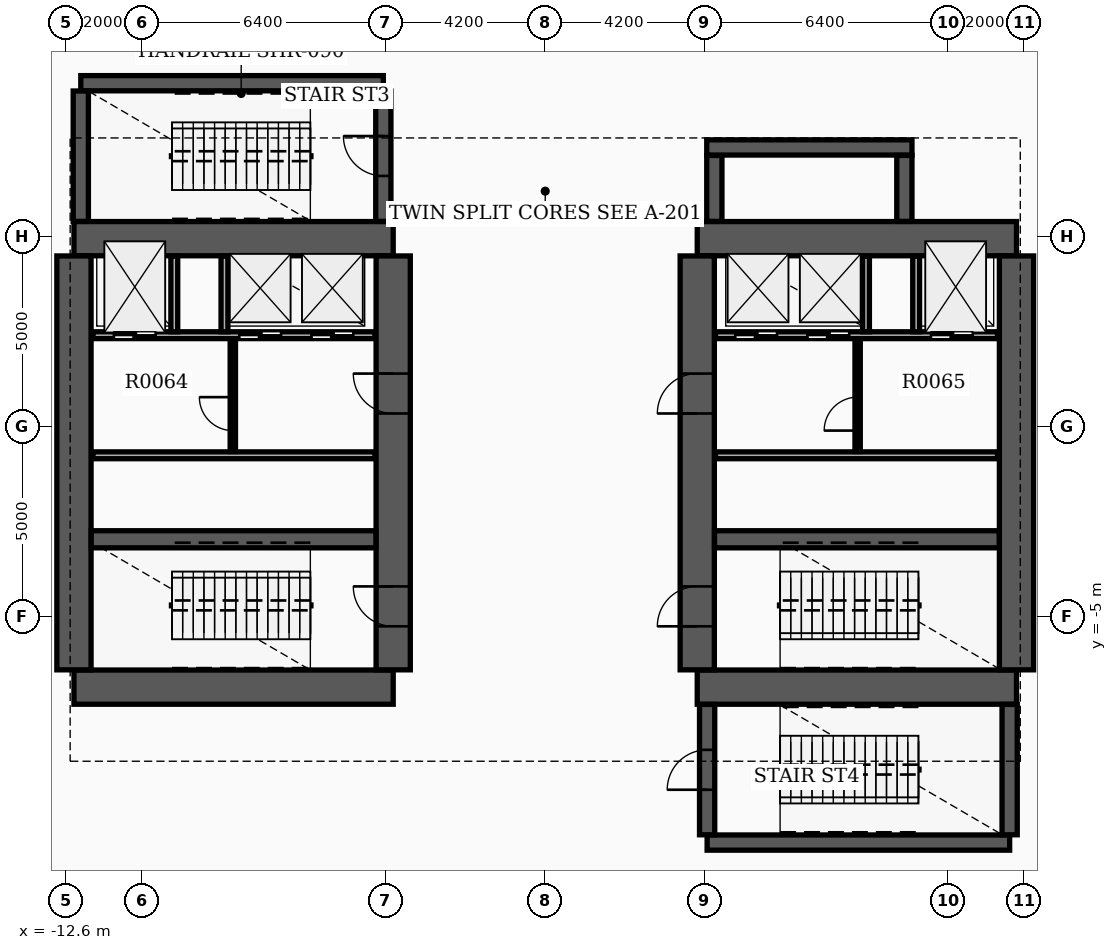
"""IFC4 building model, lengths in metres.
Left out: names, types, materials, properties, quantities, classifications, styles, units other than length and angle.
Written with IfcOpenShell. Run it as: python <this file> out.ifc"""

import sys

from ifc_helpers import new_model, si_unit, direction, frame, frame_2d, origin, place, context, subcontext, project, spatial, rectangle, extrude, element, fill, save


model = new_model("IFC4")
c1 = context("Model", 3, precision=1e-05, world=origin(), true_north=direction((0.0, 1.0)))
c2 = subcontext(c1, "Body", "Model", "MODEL_VIEW")
j1 = project(units=[si_unit("LENGTHUNIT", "METRE"), si_unit("PLANEANGLEUNIT", "RADIAN")], contexts=[c1])
p1 = place(None, origin())
s1 = spatial("IfcSite", under=j1, at=p1, CompositionType="ELEMENT")
p2 = place(p1, origin())
s2 = spatial("IfcBuilding", under=s1, at=p2, CompositionType="ELEMENT")
p3 = place(p2, frame((0.0, 0.0, -5.2)))
s3 = spatial("IfcBuildingStorey", under=s2, at=p3, CompositionType="ELEMENT", Elevation=-5.2)
for number, where, z_axis, x_axis in (
    (1, (-12.4, -6.85, 0.0), (0.0, 0.0, 1.0), (1.0, 0.0, 0.0)),
    (2, (-12.4, 4.95, 0.0), (0.0, 0.0, 1.0), (1.0, 0.0, 0.0)),
):
    element("IfcWall", number, at=place(p3, frame(where, z_axis=z_axis, x_axis=x_axis)), inside=s3, PredefinedType="SHEAR", context=c2, shape_type="SweptSolid", body=[
        extrude(rectangle(XDim=8.4, YDim=0.9, at=frame_2d((4.2, 0.0))), origin(), (0.0, 0.0, 1.0), 4.95),
    ])
p4 = place(p3, frame((-12.4, -6.395, 0.0), z_axis=(0.0, 0.0, 1.0), x_axis=(0.0, 1.0, 0.0)))
e3 = element("IfcWall", 3, at=p4, inside=s3, PredefinedType="SHEAR", context=c2, shape_type="SweptSolid", body=[
    extrude(rectangle(XDim=10.89, YDim=0.9, at=frame_2d((5.445, 0.0))), origin(), (0.0, 0.0, 1.0), 4.95),
])
p5 = place(p3, frame((-4.0, -6.395, 0.0), z_axis=(0.0, 0.0, 1.0), x_axis=(0.0, 1.0, 0.0)))
e4 = element("IfcWall", 4, at=p5, inside=s3, PredefinedType="SHEAR", context=c2, shape_type="SweptSolid", body=[
    extrude(rectangle(XDim=10.89, YDim=0.9, at=frame_2d((5.445, 0.0))), origin(), (0.0, 0.0, 1.0), 4.95),
])
p6 = place(p5, frame((1.145, 0.0, 0.0)))
e5 = element("IfcOpeningElement", 5, at=p6, cuts=e4, PredefinedType="OPENING", context=c2, shape_type="SweptSolid", body=[
    extrude(rectangle(XDim=1.05, YDim=2.15, at=frame_2d((0.525, 1.075))), frame((0.0, 0.46, 0.0), z_axis=(0.0, -1.0, 0.0), x_axis=(1.0, 0.0, 0.0)), (0.0, 0.0, 1.0), 0.92),
])
p7 = place(p5, frame((6.745, 0.0, 0.0)))
e6 = element("IfcOpeningElement", 6, at=p7, cuts=e4, PredefinedType="OPENING", context=c2, shape_type="SweptSolid", body=[
    extrude(rectangle(XDim=1.05, YDim=2.15, at=frame_2d((0.525, 1.075))), frame((0.0, 0.46, 0.0), z_axis=(0.0, -1.0, 0.0), x_axis=(1.0, 0.0, 0.0)), (0.0, 0.0, 1.0), 0.92),
])
p8 = place(p3, frame((-11.945, -2.96, 0.0), z_axis=(0.0, 0.0, 1.0), x_axis=(1.0, 0.0, 0.0)))
e7 = element("IfcWall", 7, at=p8, inside=s3, PredefinedType="SHEAR", context=c2, shape_type="SweptSolid", body=[
    extrude(rectangle(XDim=7.49, YDim=0.45, at=frame_2d((3.745, 0.0))), origin(), (0.0, 0.0, 1.0), 4.95),
])
for number, where, z_axis, x_axis in (
    (8, (4.0, -6.85, 0.0), (0.0, 0.0, 1.0), (1.0, 0.0, 0.0)),
    (9, (4.0, 4.95, 0.0), (0.0, 0.0, 1.0), (1.0, 0.0, 0.0)),
):
    element("IfcWall", number, at=place(p3, frame(where, z_axis=z_axis, x_axis=x_axis)), inside=s3, PredefinedType="SHEAR", context=c2, shape_type="SweptSolid", body=[
        extrude(rectangle(XDim=8.4, YDim=0.9, at=frame_2d((4.2, 0.0))), origin(), (0.0, 0.0, 1.0), 4.95),
    ])
p9 = place(p3, frame((4.0, -6.395, 0.0), z_axis=(0.0, 0.0, 1.0), x_axis=(0.0, 1.0, 0.0)))
e10 = element("IfcWall", 10, at=p9, inside=s3, PredefinedType="SHEAR", context=c2, shape_type="SweptSolid", body=[
    extrude(rectangle(XDim=10.89, YDim=0.9, at=frame_2d((5.445, 0.0))), origin(), (0.0, 0.0, 1.0), 4.95),
])
p10 = place(p9, frame((1.145, 0.0, 0.0)))
e11 = element("IfcOpeningElement", 11, at=p10, cuts=e10, PredefinedType="OPENING", context=c2, shape_type="SweptSolid", body=[
    extrude(rectangle(XDim=1.05, YDim=2.15, at=frame_2d((0.525, 1.075))), frame((0.0, 0.46, 0.0), z_axis=(0.0, -1.0, 0.0), x_axis=(1.0, 0.0, 0.0)), (0.0, 0.0, 1.0), 0.92),
])
p11 = place(p9, frame((6.745, 0.0, 0.0)))
e12 = element("IfcOpeningElement", 12, at=p11, cuts=e10, PredefinedType="OPENING", context=c2, shape_type="SweptSolid", body=[
    extrude(rectangle(XDim=1.05, YDim=2.15, at=frame_2d((0.525, 1.075))), frame((0.0, 0.46, 0.0), z_axis=(0.0, -1.0, 0.0), x_axis=(1.0, 0.0, 0.0)), (0.0, 0.0, 1.0), 0.92),
])
p12 = place(p3, frame((12.4, -6.395, 0.0), z_axis=(0.0, 0.0, 1.0), x_axis=(0.0, 1.0, 0.0)))
e13 = element("IfcWall", 13, at=p12, inside=s3, PredefinedType="SHEAR", context=c2, shape_type="SweptSolid", body=[
    extrude(rectangle(XDim=10.89, YDim=0.9, at=frame_2d((5.445, 0.0))), origin(), (0.0, 0.0, 1.0), 4.95),
])
p13 = place(p3, frame((4.455, -2.96, 0.0), z_axis=(0.0, 0.0, 1.0), x_axis=(1.0, 0.0, 0.0)))
e14 = element("IfcWall", 14, at=p13, inside=s3, PredefinedType="SHEAR", context=c2, shape_type="SweptSolid", body=[
    extrude(rectangle(XDim=7.49, YDim=0.45, at=frame_2d((3.745, 0.0))), origin(), (0.0, 0.0, 1.0), 4.95),
])
p14 = place(p3, frame((-12.22, 9.04, 0.0), z_axis=(0.0, 0.0, 1.0), x_axis=(1.0, 0.0, 0.0)))
e15 = element("IfcWall", 15, at=p14, inside=s3, PredefinedType="SHEAR", context=c2, shape_type="SweptSolid", body=[
    extrude(rectangle(XDim=7.96, YDim=0.4, at=frame_2d((3.98, 0.0))), origin(), (0.0, 0.0, 1.0), 4.95),
])
p15 = place(p3, frame((-12.22, 5.405, 0.0), z_axis=(0.0, 0.0, 1.0), x_axis=(0.0, 1.0, 0.0)))
e16 = element("IfcWall", 16, at=p15, inside=s3, PredefinedType="SHEAR", context=c2, shape_type="SweptSolid", body=[
    extrude(rectangle(XDim=3.43, YDim=0.4, at=frame_2d((1.715, 0.0))), origin(), (0.0, 0.0, 1.0), 4.95),
])
p16 = place(p3, frame((-4.26, 5.405, 0.0), z_axis=(0.0, 0.0, 1.0), x_axis=(0.0, 1.0, 0.0)))
e17 = element("IfcWall", 17, at=p16, inside=s3, PredefinedType="SHEAR", context=c2, shape_type="SweptSolid", body=[
    extrude(rectangle(XDim=3.43, YDim=0.4, at=frame_2d((1.715, 0.0))), origin(), (0.0, 0.0, 1.0), 4.95),
])
p17 = place(p16, frame((1.195, 0.0, 0.0)))
e18 = element("IfcOpeningElement", 18, at=p17, cuts=e17, PredefinedType="OPENING", context=c2, shape_type="SweptSolid", body=[
    extrude(rectangle(XDim=1.05, YDim=2.15, at=frame_2d((0.525, 1.075))), frame((0.0, 0.21, 0.0), z_axis=(0.0, -1.0, 0.0), x_axis=(1.0, 0.0, 0.0)), (0.0, 0.0, 1.0), 0.42),
])
p18 = place(p3, frame((4.26, -10.94, 0.0), z_axis=(0.0, 0.0, 1.0), x_axis=(1.0, 0.0, 0.0)))
e19 = element("IfcWall", 19, at=p18, inside=s3, PredefinedType="SHEAR", context=c2, shape_type="SweptSolid", body=[
    extrude(rectangle(XDim=7.96, YDim=0.4, at=frame_2d((3.98, 0.0))), origin(), (0.0, 0.0, 1.0), 4.95),
])
p19 = place(p3, frame((4.26, -10.735, 0.0), z_axis=(0.0, 0.0, 1.0), x_axis=(0.0, 1.0, 0.0)))
e20 = element("IfcWall", 20, at=p19, inside=s3, PredefinedType="SHEAR", context=c2, shape_type="SweptSolid", body=[
    extrude(rectangle(XDim=3.43, YDim=0.4, at=frame_2d((1.715, 0.0))), origin(), (0.0, 0.0, 1.0), 4.95),
])
p20 = place(p19, frame((1.185, 0.0, 0.0)))
e21 = element("IfcOpeningElement", 21, at=p20, cuts=e20, PredefinedType="OPENING", context=c2, shape_type="SweptSolid", body=[
    extrude(rectangle(XDim=1.05, YDim=2.15, at=frame_2d((0.525, 1.075))), frame((0.0, 0.21, 0.0), z_axis=(0.0, -1.0, 0.0), x_axis=(1.0, 0.0, 0.0)), (0.0, 0.0, 1.0), 0.42),
])
p21 = place(p3, frame((12.22, -10.735, 0.0), z_axis=(0.0, 0.0, 1.0), x_axis=(0.0, 1.0, 0.0)))
e22 = element("IfcWall", 22, at=p21, inside=s3, PredefinedType="SHEAR", context=c2, shape_type="SweptSolid", body=[
    extrude(rectangle(XDim=3.43, YDim=0.4, at=frame_2d((1.715, 0.0))), origin(), (0.0, 0.0, 1.0), 4.95),
])
p22 = place(p3, frame((4.45, 5.405, 0.0), z_axis=(0.0, 0.0, 1.0), x_axis=(0.0, 1.0, 0.0)))
e23 = element("IfcWall", 23, at=p22, inside=s3, PredefinedType="SHEAR", context=c2, shape_type="SweptSolid", body=[
    extrude(rectangle(XDim=1.735, YDim=0.4, at=frame_2d((0.867, 0.0))), origin(), (0.0, 0.0, 1.0), 4.95),
])
p23 = place(p3, frame((4.25, 7.35, 0.0), z_axis=(0.0, 0.0, 1.0), x_axis=(1.0, 0.0, 0.0)))
e24 = element("IfcWall", 24, at=p23, inside=s3, PredefinedType="SHEAR", context=c2, shape_type="SweptSolid", body=[
    extrude(rectangle(XDim=5.4, YDim=0.4, at=frame_2d((2.7, 0.0))), origin(), (0.0, 0.0, 1.0), 4.95),
])
p24 = place(p3, frame((9.45, 5.405, 0.0), z_axis=(0.0, 0.0, 1.0), x_axis=(0.0, 1.0, 0.0)))
e25 = element("IfcWall", 25, at=p24, inside=s3, PredefinedType="SHEAR", context=c2, shape_type="SweptSolid", body=[
    extrude(rectangle(XDim=1.735, YDim=0.4, at=frame_2d((0.867, 0.0))), origin(), (0.0, 0.0, 1.0), 4.95),
])
p25 = place(p3, frame((-11.9, 2.41, 0.0), z_axis=(0.0, 0.0, 1.0), x_axis=(1.0, 0.0, 0.0)))
e26 = element("IfcWall", 26, at=p25, inside=s3, PredefinedType="SOLIDWALL", context=c2, shape_type="SweptSolid", body=[
    extrude(rectangle(XDim=7.42, YDim=0.18, at=frame_2d((3.71, 0.0))), origin(), (0.0, 0.0, 1.0), 3.97),
])
p26 = place(p25, frame((0.55, 0.0, 0.0)))
e27 = element("IfcOpeningElement", 27, at=p26, cuts=e26, PredefinedType="OPENING", context=c2, shape_type="SweptSolid", body=[
    extrude(rectangle(XDim=1.1, YDim=2.15, at=frame_2d((0.55, 1.075))), frame((0.0, 0.1, 0.0), z_axis=(0.0, -1.0, 0.0), x_axis=(1.0, 0.0, 0.0)), (0.0, 0.0, 1.0), 0.2),
])
p27 = place(p25, frame((3.85, 0.0, 0.0)))
e28 = element("IfcOpeningElement", 28, at=p27, cuts=e26, PredefinedType="OPENING", context=c2, shape_type="SweptSolid", body=[
    extrude(rectangle(XDim=1.1, YDim=2.15, at=frame_2d((0.55, 1.075))), frame((0.0, 0.1, 0.0), z_axis=(0.0, -1.0, 0.0), x_axis=(1.0, 0.0, 0.0)), (0.0, 0.0, 1.0), 0.2),
])
p28 = place(p25, frame((5.75, 0.0, 0.0)))
e29 = element("IfcOpeningElement", 29, at=p28, cuts=e26, PredefinedType="OPENING", context=c2, shape_type="SweptSolid", body=[
    extrude(rectangle(XDim=1.1, YDim=2.15, at=frame_2d((0.55, 1.075))), frame((0.0, 0.1, 0.0), z_axis=(0.0, -1.0, 0.0), x_axis=(1.0, 0.0, 0.0)), (0.0, 0.0, 1.0), 0.2),
])
p29 = place(p3, frame((4.48, 2.41, 0.0), z_axis=(0.0, 0.0, 1.0), x_axis=(1.0, 0.0, 0.0)))
e30 = element("IfcWall", 30, at=p29, inside=s3, PredefinedType="SOLIDWALL", context=c2, shape_type="SweptSolid", body=[
    extrude(rectangle(XDim=7.42, YDim=0.18, at=frame_2d((3.71, 0.0))), origin(), (0.0, 0.0, 1.0), 3.97),
])
p30 = place(p29, frame((5.67, 0.0, 0.0)))
e31 = element("IfcOpeningElement", 31, at=p30, cuts=e30, PredefinedType="OPENING", context=c2, shape_type="SweptSolid", body=[
    extrude(rectangle(XDim=1.1, YDim=2.15, at=frame_2d((0.55, 1.075))), frame((0.0, 0.1, 0.0), z_axis=(0.0, -1.0, 0.0), x_axis=(1.0, 0.0, 0.0)), (0.0, 0.0, 1.0), 0.2),
])
p31 = place(p29, frame((0.52, 0.0, 0.0)))
e32 = element("IfcOpeningElement", 32, at=p31, cuts=e30, PredefinedType="OPENING", context=c2, shape_type="SweptSolid", body=[
    extrude(rectangle(XDim=1.1, YDim=2.15, at=frame_2d((0.55, 1.075))), frame((0.0, 0.1, 0.0), z_axis=(0.0, -1.0, 0.0), x_axis=(1.0, 0.0, 0.0)), (0.0, 0.0, 1.0), 0.2),
])
p32 = place(p29, frame((2.42, 0.0, 0.0)))
e33 = element("IfcOpeningElement", 33, at=p32, cuts=e30, PredefinedType="OPENING", context=c2, shape_type="SweptSolid", body=[
    extrude(rectangle(XDim=1.1, YDim=2.15, at=frame_2d((0.55, 1.075))), frame((0.0, 0.1, 0.0), z_axis=(0.0, -1.0, 0.0), x_axis=(1.0, 0.0, 0.0)), (0.0, 0.0, 1.0), 0.2),
])
for number, where, z_axis, x_axis in (
    (34, (-11.9, -0.75, 0.0), (0.0, 0.0, 1.0), (1.0, 0.0, 0.0)),
    (35, (4.48, -0.75, 0.0), (0.0, 0.0, 1.0), (1.0, 0.0, 0.0)),
):
    element("IfcWall", number, at=place(p3, frame(where, z_axis=z_axis, x_axis=x_axis)), inside=s3, PredefinedType="SOLIDWALL", context=c2, shape_type="SweptSolid", body=[
        extrude(rectangle(XDim=7.42, YDim=0.18, at=frame_2d((3.71, 0.0))), origin(), (0.0, 0.0, 1.0), 3.97),
    ])
for number, where, z_axis, x_axis in (
    (36, (-9.76, 2.5, 0.0), (0.0, 0.0, 1.0), (0.0, 1.0, 0.0)),
    (37, (-8.44, 2.5, 0.0), (0.0, 0.0, 1.0), (0.0, 1.0, 0.0)),
    (38, (8.44, 2.5, 0.0), (0.0, 0.0, 1.0), (0.0, 1.0, 0.0)),
    (39, (9.76, 2.5, 0.0), (0.0, 0.0, 1.0), (0.0, 1.0, 0.0)),
):
    element("IfcWall", number, at=place(p3, frame(where, z_axis=z_axis, x_axis=x_axis)), inside=s3, PredefinedType="SOLIDWALL", context=c2, shape_type="SweptSolid", body=[
        extrude(rectangle(XDim=1.99, YDim=0.18, at=frame_2d((0.995, 0.0))), origin(), (0.0, 0.0, 1.0), 3.97),
    ])
p33 = place(p3, frame((-8.22, -0.65, 0.0), z_axis=(0.0, 0.0, 1.0), x_axis=(0.0, 1.0, 0.0)))
e40 = element("IfcWall", 40, at=p33, inside=s3, PredefinedType="SOLIDWALL", context=c2, shape_type="SweptSolid", body=[
    extrude(rectangle(XDim=2.96, YDim=0.14, at=frame_2d((1.48, 0.0))), origin(), (0.0, 0.0, 1.0), 3.97),
])
p34 = place(p33, frame((0.55, 0.0, 0.0)))
e41 = element("IfcOpeningElement", 41, at=p34, cuts=e40, PredefinedType="OPENING", context=c2, shape_type="SweptSolid", body=[
    extrude(rectangle(XDim=0.88, YDim=2.1, at=frame_2d((0.44, 1.05))), frame((0.0, 0.08, 0.0), z_axis=(0.0, -1.0, 0.0), x_axis=(1.0, 0.0, 0.0)), (0.0, 0.0, 1.0), 0.16),
])
p35 = place(p3, frame((8.22, -0.65, 0.0), z_axis=(0.0, 0.0, 1.0), x_axis=(0.0, 1.0, 0.0)))
e42 = element("IfcWall", 42, at=p35, inside=s3, PredefinedType="SOLIDWALL", context=c2, shape_type="SweptSolid", body=[
    extrude(rectangle(XDim=2.96, YDim=0.14, at=frame_2d((1.48, 0.0))), origin(), (0.0, 0.0, 1.0), 3.97),
])
p36 = place(p35, frame((0.55, 0.0, 0.0)))
e43 = element("IfcOpeningElement", 43, at=p36, cuts=e42, PredefinedType="OPENING", context=c2, shape_type="SweptSolid", body=[
    extrude(rectangle(XDim=0.88, YDim=2.1, at=frame_2d((0.44, 1.05))), frame((0.0, 0.08, 0.0), z_axis=(0.0, -1.0, 0.0), x_axis=(1.0, 0.0, 0.0)), (0.0, 0.0, 1.0), 0.16),
])
p37 = place(p6, origin())
e44 = element("IfcDoor", 44, at=p37, inside=s3, OperationType="SINGLE_SWING_RIGHT", PredefinedType="DOOR", context=c2, shape_type="SweptSolid", body=[
    extrude(rectangle(XDim=1.05, YDim=2.15, at=frame_2d((0.525, 1.075))), frame((0.0, 0.025, 0.0), z_axis=(0.0, -1.0, 0.0), x_axis=(1.0, 0.0, 0.0)), (0.0, 0.0, 1.0), 0.05),
])
fill(e5, e44)
p38 = place(p10, origin())
e45 = element("IfcDoor", 45, at=p38, inside=s3, OperationType="SINGLE_SWING_LEFT", PredefinedType="DOOR", context=c2, shape_type="SweptSolid", body=[
    extrude(rectangle(XDim=1.05, YDim=2.15, at=frame_2d((0.525, 1.075))), frame((0.0, 0.025, 0.0), z_axis=(0.0, -1.0, 0.0), x_axis=(1.0, 0.0, 0.0)), (0.0, 0.0, 1.0), 0.05),
])
fill(e11, e45)
p39 = place(p7, origin())
e46 = element("IfcDoor", 46, at=p39, inside=s3, OperationType="SINGLE_SWING_RIGHT", PredefinedType="DOOR", context=c2, shape_type="SweptSolid", body=[
    extrude(rectangle(XDim=1.05, YDim=2.15, at=frame_2d((0.525, 1.075))), frame((0.0, 0.025, 0.0), z_axis=(0.0, -1.0, 0.0), x_axis=(1.0, 0.0, 0.0)), (0.0, 0.0, 1.0), 0.05),
])
fill(e6, e46)
p40 = place(p11, origin())
e47 = element("IfcDoor", 47, at=p40, inside=s3, OperationType="SINGLE_SWING_LEFT", PredefinedType="DOOR", context=c2, shape_type="SweptSolid", body=[
    extrude(rectangle(XDim=1.05, YDim=2.15, at=frame_2d((0.525, 1.075))), frame((0.0, 0.025, 0.0), z_axis=(0.0, -1.0, 0.0), x_axis=(1.0, 0.0, 0.0)), (0.0, 0.0, 1.0), 0.05),
])
fill(e12, e47)
p41 = place(p17, origin())
e48 = element("IfcDoor", 48, at=p41, inside=s3, OperationType="SINGLE_SWING_RIGHT", PredefinedType="DOOR", context=c2, shape_type="SweptSolid", body=[
    extrude(rectangle(XDim=1.05, YDim=2.15, at=frame_2d((0.525, 1.075))), frame((0.0, 0.025, 0.0), z_axis=(0.0, -1.0, 0.0), x_axis=(1.0, 0.0, 0.0)), (0.0, 0.0, 1.0), 0.05),
])
fill(e18, e48)
p42 = place(p20, origin())
e49 = element("IfcDoor", 49, at=p42, inside=s3, OperationType="SINGLE_SWING_LEFT", PredefinedType="DOOR", context=c2, shape_type="SweptSolid", body=[
    extrude(rectangle(XDim=1.05, YDim=2.15, at=frame_2d((0.525, 1.075))), frame((0.0, 0.025, 0.0), z_axis=(0.0, -1.0, 0.0), x_axis=(1.0, 0.0, 0.0)), (0.0, 0.0, 1.0), 0.05),
])
fill(e21, e49)
p43 = place(p26, origin())
e50 = element("IfcDoor", 50, at=p43, inside=s3, OperationType="DOUBLE_DOOR_SLIDING", PredefinedType="DOOR", context=c2, shape_type="SweptSolid", body=[
    extrude(rectangle(XDim=1.1, YDim=2.15, at=frame_2d((0.55, 1.075))), frame((0.0, 0.025, 0.0), z_axis=(0.0, -1.0, 0.0), x_axis=(1.0, 0.0, 0.0)), (0.0, 0.0, 1.0), 0.05),
])
fill(e27, e50)
p44 = place(p30, origin())
e51 = element("IfcDoor", 51, at=p44, inside=s3, OperationType="DOUBLE_DOOR_SLIDING", PredefinedType="DOOR", context=c2, shape_type="SweptSolid", body=[
    extrude(rectangle(XDim=1.1, YDim=2.15, at=frame_2d((0.55, 1.075))), frame((0.0, 0.025, 0.0), z_axis=(0.0, -1.0, 0.0), x_axis=(1.0, 0.0, 0.0)), (0.0, 0.0, 1.0), 0.05),
])
fill(e31, e51)
p45 = place(p27, origin())
e52 = element("IfcDoor", 52, at=p45, inside=s3, OperationType="DOUBLE_DOOR_SLIDING", PredefinedType="DOOR", context=c2, shape_type="SweptSolid", body=[
    extrude(rectangle(XDim=1.1, YDim=2.15, at=frame_2d((0.55, 1.075))), frame((0.0, 0.025, 0.0), z_axis=(0.0, -1.0, 0.0), x_axis=(1.0, 0.0, 0.0)), (0.0, 0.0, 1.0), 0.05),
])
fill(e28, e52)
p46 = place(p28, origin())
e53 = element("IfcDoor", 53, at=p46, inside=s3, OperationType="DOUBLE_DOOR_SLIDING", PredefinedType="DOOR", context=c2, shape_type="SweptSolid", body=[
    extrude(rectangle(XDim=1.1, YDim=2.15, at=frame_2d((0.55, 1.075))), frame((0.0, 0.025, 0.0), z_axis=(0.0, -1.0, 0.0), x_axis=(1.0, 0.0, 0.0)), (0.0, 0.0, 1.0), 0.05),
])
fill(e29, e53)
p47 = place(p31, origin())
e54 = element("IfcDoor", 54, at=p47, inside=s3, OperationType="DOUBLE_DOOR_SLIDING", PredefinedType="DOOR", context=c2, shape_type="SweptSolid", body=[
    extrude(rectangle(XDim=1.1, YDim=2.15, at=frame_2d((0.55, 1.075))), frame((0.0, 0.025, 0.0), z_axis=(0.0, -1.0, 0.0), x_axis=(1.0, 0.0, 0.0)), (0.0, 0.0, 1.0), 0.05),
])
fill(e32, e54)
p48 = place(p32, origin())
e55 = element("IfcDoor", 55, at=p48, inside=s3, OperationType="DOUBLE_DOOR_SLIDING", PredefinedType="DOOR", context=c2, shape_type="SweptSolid", body=[
    extrude(rectangle(XDim=1.1, YDim=2.15, at=frame_2d((0.55, 1.075))), frame((0.0, 0.025, 0.0), z_axis=(0.0, -1.0, 0.0), x_axis=(1.0, 0.0, 0.0)), (0.0, 0.0, 1.0), 0.05),
])
fill(e33, e55)
p49 = place(p34, origin())
e56 = element("IfcDoor", 56, at=p49, inside=s3, OperationType="SINGLE_SWING_RIGHT", PredefinedType="DOOR", context=c2, shape_type="SweptSolid", body=[
    extrude(rectangle(XDim=0.88, YDim=2.1, at=frame_2d((0.44, 1.05))), frame((0.0, 0.025, 0.0), z_axis=(0.0, -1.0, 0.0), x_axis=(1.0, 0.0, 0.0)), (0.0, 0.0, 1.0), 0.05),
])
fill(e41, e56)
p50 = place(p36, origin())
e57 = element("IfcDoor", 57, at=p50, inside=s3, OperationType="SINGLE_SWING_LEFT", PredefinedType="DOOR", context=c2, shape_type="SweptSolid", body=[
    extrude(rectangle(XDim=0.88, YDim=2.1, at=frame_2d((0.44, 1.05))), frame((0.0, 0.025, 0.0), z_axis=(0.0, -1.0, 0.0), x_axis=(1.0, 0.0, 0.0)), (0.0, 0.0, 1.0), 0.05),
])
fill(e43, e57)
save(model, sys.argv[1])
